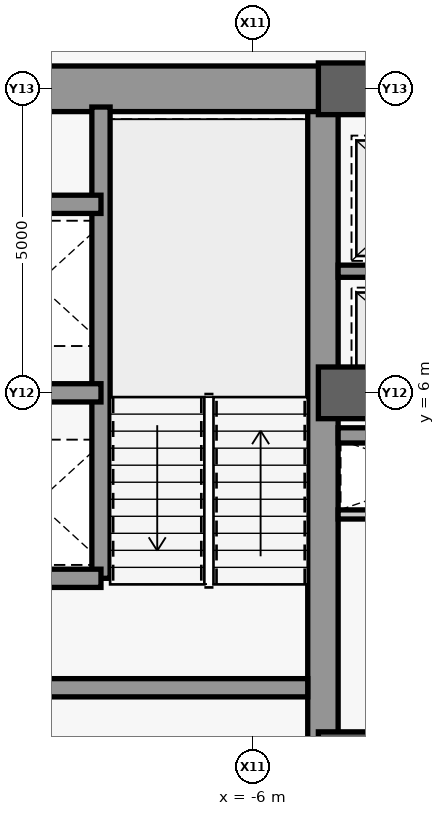
"""IFC4 building model, lengths in metres.
Left out: names, types, materials, properties, quantities, classifications, styles, units other than length and angle.
Written with IfcOpenShell. Run it as: python <this file> out.ifc"""

import sys

from ifc_helpers import new_model, si_unit, direction, frame, frame_2d, origin, origin_2d, place, context, subcontext, project, spatial, rectangle, extrude, source, transform, mapped, element, save


model = new_model("IFC4")
c1 = context("Model", 3, precision=1e-05, world=origin(), true_north=direction((0.0, 1.0)))
c2 = subcontext(c1, "Body", "Model", "MODEL_VIEW")
j1 = project(units=[si_unit("LENGTHUNIT", "METRE"), si_unit("PLANEANGLEUNIT", "RADIAN")], contexts=[c1])
p1 = place(None, origin())
s1 = spatial("IfcSite", under=j1, at=p1, CompositionType="ELEMENT")
p2 = place(p1, origin())
s2 = spatial("IfcBuilding", under=s1, at=p2, CompositionType="ELEMENT")
p3 = place(p2, frame((0.0, 0.0, 203.1)))
s3 = spatial("IfcBuildingStorey", under=s2, at=p3, CompositionType="ELEMENT", Elevation=203.1)
m1 = source(origin(), c2, "Body", "SweptSolid", [
    extrude(rectangle(XDim=21.4, YDim=0.5, at=frame_2d((10.7, 0.0))), origin(), (0.0, 0.0, 1.0), 3.78),
])
p4 = place(p3, frame((-4.85, -10.7, 0.0), z_axis=(0.0, 0.0, 1.0), x_axis=(0.0, 1.0, 0.0)))
e1 = element("IfcWall", 1, at=p4, inside=s3, PredefinedType="SHEAR", context=c2, shape_type="MappedRepresentation", body=[
    mapped(m1, transform((0.0, 0.0, 0.0), scale=1.0)),
])
m2 = source(origin(), c2, "Body", "SweptSolid", [
    extrude(rectangle(XDim=5.85, YDim=0.75, at=frame_2d((2.925, 0.0))), origin(), (0.0, 0.0, 1.0), 3.78),
])
p5 = place(p3, frame((-10.7, 11.0, 0.0), z_axis=(0.0, 0.0, 1.0), x_axis=(1.0, 0.0, 0.0)))
e2 = element("IfcWall", 2, at=p5, inside=s3, PredefinedType="SHEAR", context=c2, shape_type="MappedRepresentation", body=[
    mapped(m2, transform((0.0, 0.0, 0.0), scale=1.0)),
])
m3 = source(origin(), c2, "Body", "SweptSolid", [
    extrude(rectangle(XDim=5.6, YDim=0.3, at=frame_2d((2.8, 0.0))), origin(), (0.0, 0.0, 1.0), 3.78),
])
p6 = place(p3, frame((-10.7, 1.15, 0.0), z_axis=(0.0, 0.0, 1.0), x_axis=(1.0, 0.0, 0.0)))
e3 = element("IfcWall", 3, at=p6, inside=s3, PredefinedType="SHEAR", context=c2, shape_type="MappedRepresentation", body=[
    mapped(m3, transform((0.0, 0.0, 0.0), scale=1.0)),
])
m4 = source(origin(), c2, "Body", "SweptSolid", [
    extrude(rectangle(XDim=9.2, YDim=0.5, at=frame_2d((4.6, 0.0))), origin(), (0.0, 0.0, 1.0), 3.78),
])
p7 = place(p3, frame((-4.6, 11.0, 0.0), z_axis=(0.0, 0.0, 1.0), x_axis=(1.0, 0.0, 0.0)))
e4 = element("IfcWall", 4, at=p7, inside=s3, PredefinedType="SHEAR", context=c2, shape_type="MappedRepresentation", body=[
    mapped(m4, transform((0.0, 0.0, 0.0), scale=1.0)),
])
m5 = source(origin(), c2, "Body", "SweptSolid", [
    extrude(rectangle(XDim=1.8, YDim=2.25, at=frame_2d((0.9, 1.125))), frame((0.0, 0.26, 0.0), z_axis=(0.0, -1.0, 0.0), x_axis=(1.0, 0.0, 0.0)), (0.0, 0.0, 1.0), 0.52),
])
p8 = place(p7, frame((3.7, 0.0, 0.0)))
e5 = element("IfcOpeningElement", 5, at=p8, cuts=e4, PredefinedType="OPENING", context=c2, shape_type="MappedRepresentation", body=[
    mapped(m5, transform((0.0, 0.0, 0.0), scale=1.0)),
])
m6 = source(origin(), c2, "Body", "SweptSolid", [
    extrude(rectangle(XDim=0.85, YDim=0.85, at=origin_2d()), origin(), (0.0, 0.0, 1.0), 4.0),
])
for number, where, z_axis, x_axis in (
    (6, (-4.5, 0.0, 0.0), (0.0, 0.0, 1.0), (1.0, 0.0, 0.0)),
    (7, (-4.5, 6.0, 0.0), (0.0, 0.0, 1.0), (1.0, 0.0, 0.0)),
    (8, (-4.5, 11.0, 0.0), (0.0, 0.0, 1.0), (1.0, 0.0, 0.0)),
):
    element("IfcColumn", number, at=place(p3, frame(where, z_axis=z_axis, x_axis=x_axis)), inside=s3, PredefinedType="COLUMN", context=c2, shape_type="MappedRepresentation", body=[
        mapped(m6, transform((0.0, 0.0, 0.0), scale=1.0)),
    ])
m7 = source(origin(), c2, "Body", "SweptSolid", [
    extrude(rectangle(XDim=7.75, YDim=0.3, at=frame_2d((3.875, 0.0))), origin(), (0.0, 0.0, 1.0), 3.78),
])
p9 = place(p3, frame((-8.5, 2.95, 0.0), z_axis=(0.0, 0.0, 1.0), x_axis=(0.0, 1.0, 0.0)))
e9 = element("IfcWall", 9, at=p9, inside=s3, PredefinedType="SHEAR", context=c2, shape_type="MappedRepresentation", body=[
    mapped(m7, transform((0.0, 0.0, 0.0), scale=1.0)),
])
m8 = source(origin(), c2, "Body", "SweptSolid", [
    extrude(rectangle(XDim=2.2, YDim=0.3, at=frame_2d((1.1, 0.0))), origin(), (0.0, 0.0, 1.0), 3.78),
])
for number, where, z_axis, x_axis in (
    (10, (-10.7, 2.95, 0.0), (0.0, 0.0, 1.0), (1.0, 0.0, 0.0)),
    (11, (-10.7, 6.0, 0.0), (0.0, 0.0, 1.0), (1.0, 0.0, 0.0)),
    (12, (-10.7, 9.1, 0.0), (0.0, 0.0, 1.0), (1.0, 0.0, 0.0)),
):
    element("IfcWall", number, at=place(p3, frame(where, z_axis=z_axis, x_axis=x_axis)), inside=s3, PredefinedType="SHEAR", context=c2, shape_type="MappedRepresentation", body=[
        mapped(m8, transform((0.0, 0.0, 0.0), scale=1.0)),
    ])
m9 = source(origin(), c2, "Body", "SweptSolid", [
    extrude(rectangle(XDim=3.45, YDim=0.15, at=frame_2d((1.725, 0.0))), origin(), (0.0, 0.0, 1.0), 3.78),
])
p10 = place(p3, frame((-4.6, 4.0, 0.0), z_axis=(0.0, 0.0, 1.0), x_axis=(1.0, 0.0, 0.0)))
e13 = element("IfcWall", 13, at=p10, inside=s3, PredefinedType="PARTITIONING", context=c2, shape_type="MappedRepresentation", body=[
    mapped(m9, transform((0.0, 0.0, 0.0), scale=1.0)),
])
m10 = source(origin(), c2, "Body", "SweptSolid", [
    extrude(rectangle(XDim=2.45, YDim=0.2, at=frame_2d((1.225, 0.0))), origin(), (0.0, 0.0, 1.0), 3.78),
])
p11 = place(p3, frame((-4.6, 8.0, 0.0), z_axis=(0.0, 0.0, 1.0), x_axis=(1.0, 0.0, 0.0)))
e14 = element("IfcWall", 14, at=p11, inside=s3, PredefinedType="SHEAR", context=c2, shape_type="MappedRepresentation", body=[
    mapped(m10, transform((0.0, 0.0, 0.0), scale=1.0)),
])
m11 = source(origin(), c2, "Body", "SweptSolid", [
    extrude(rectangle(XDim=9.2, YDim=0.25, at=frame_2d((4.6, 0.0))), origin(), (0.0, 0.0, 1.0), 3.78),
])
p12 = place(p3, frame((-4.6, 5.3, 0.0), z_axis=(0.0, 0.0, 1.0), x_axis=(1.0, 0.0, 0.0)))
e15 = element("IfcWall", 15, at=p12, inside=s3, PredefinedType="SHEAR", context=c2, shape_type="MappedRepresentation", body=[
    mapped(m11, transform((0.0, 0.0, 0.0), scale=1.0)),
])
m12 = source(origin(), c2, "Body", "SweptSolid", [
    extrude(rectangle(XDim=1.05, YDim=2.2, at=frame_2d((0.525, 1.1))), frame((0.0, 0.135, 0.0), z_axis=(0.0, -1.0, 0.0), x_axis=(1.0, 0.0, 0.0)), (0.0, 0.0, 1.0), 0.27),
])
p13 = place(p12, frame((4.075, 0.0, 0.0)))
e16 = element("IfcOpeningElement", 16, at=p13, cuts=e15, PredefinedType="OPENING", context=c2, shape_type="MappedRepresentation", body=[
    mapped(m12, transform((0.0, 0.0, 0.0), scale=1.0)),
])
save(model, sys.argv[1])
